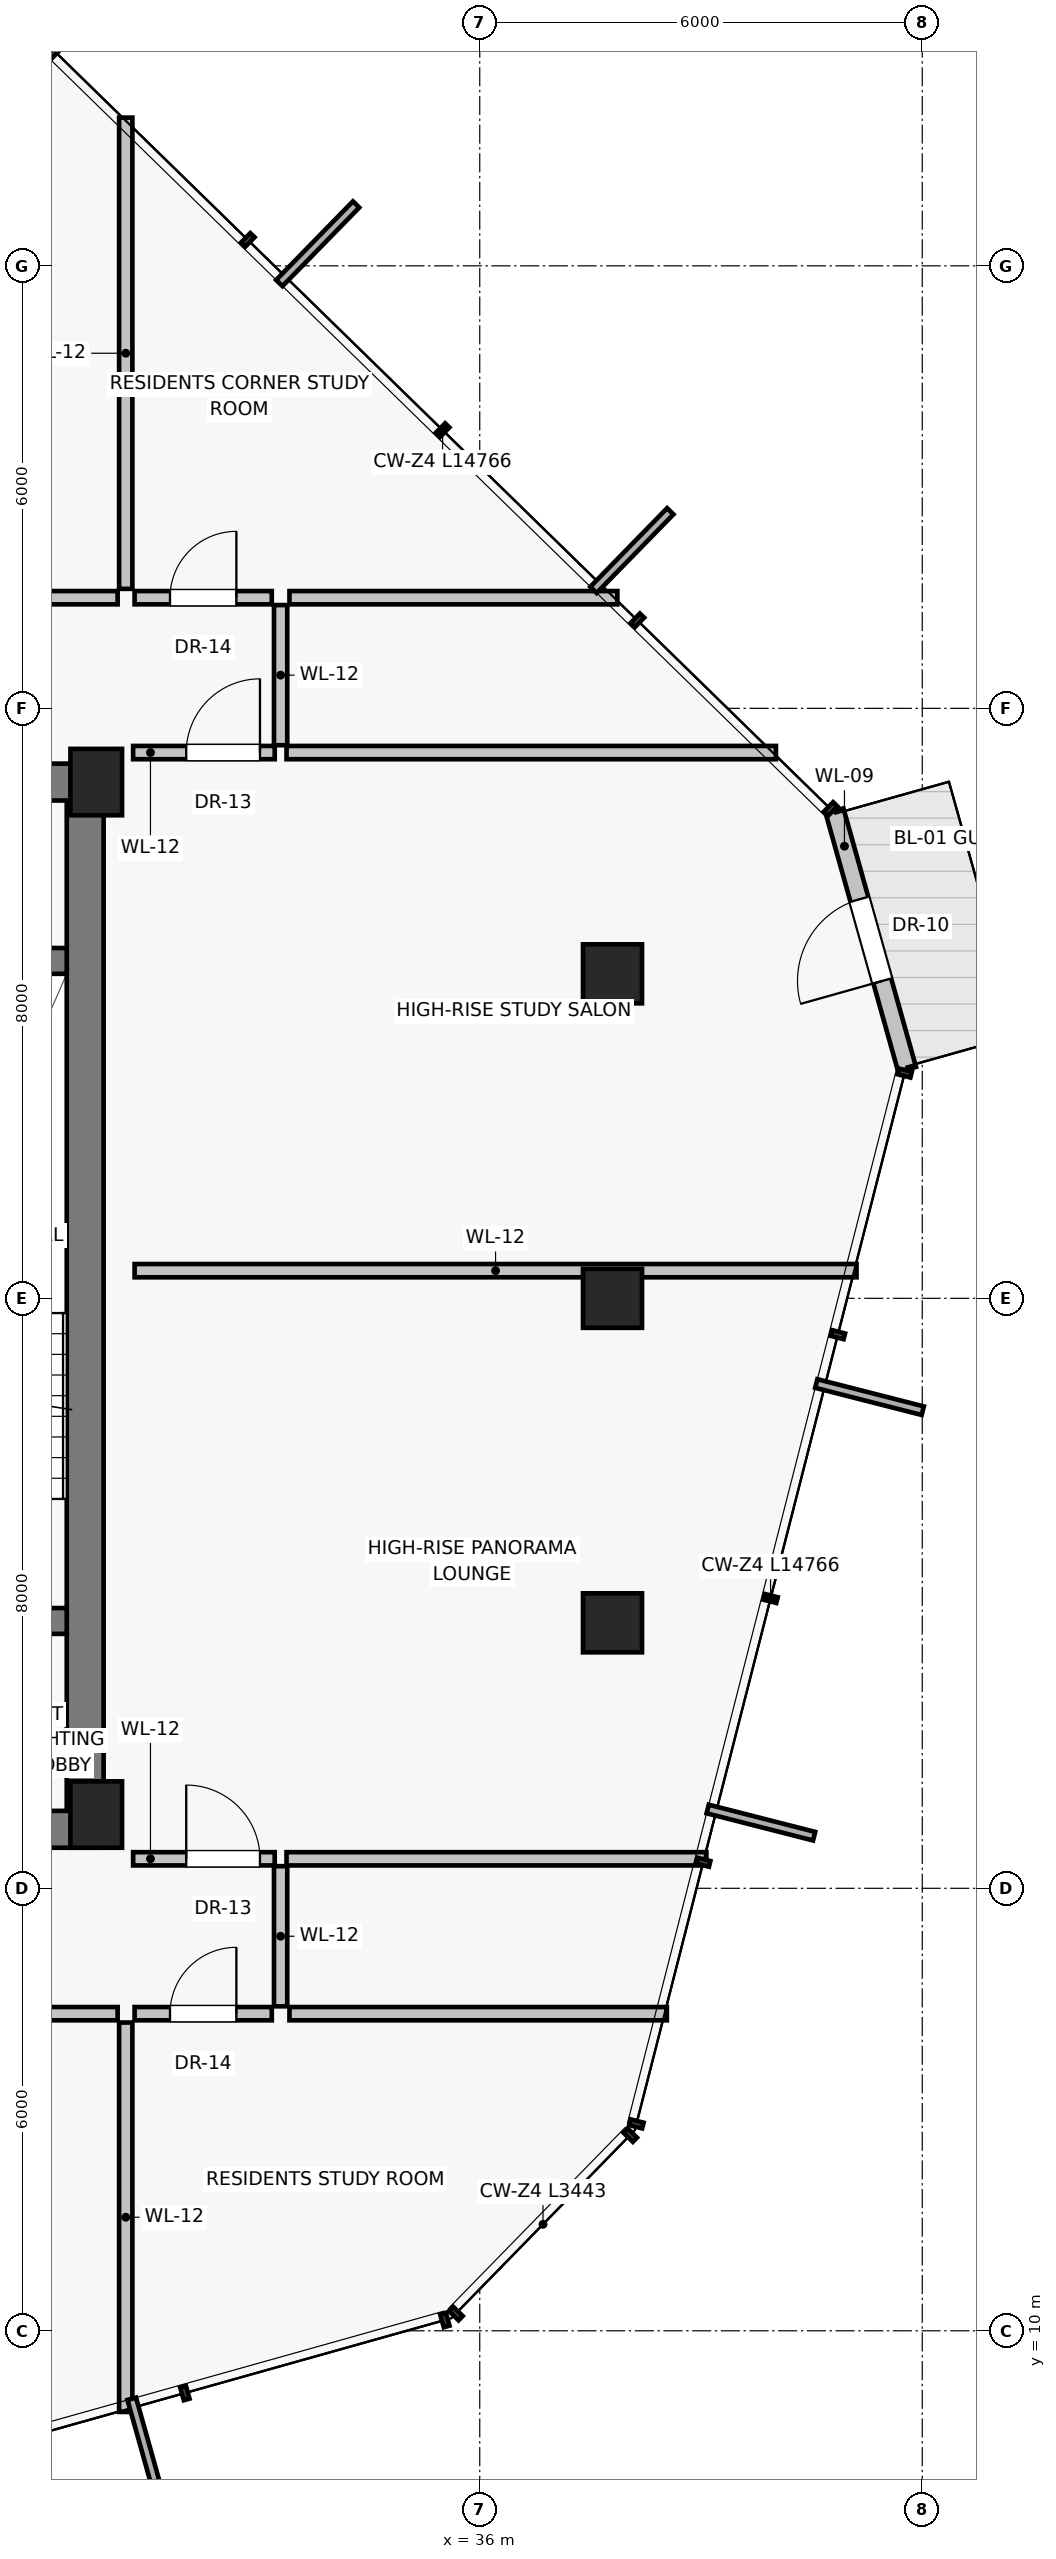
"""IFC4 building model, lengths in metres.
Left out: names, types, materials, properties, quantities, classifications, styles, units other than length and angle.
Written with IfcOpenShell. Run it as: python <this file> out.ifc"""

import sys

from ifc_helpers import new_model, si_unit, direction, frame, frame_2d, origin, origin_2d, place, context, subcontext, project, spatial, rectangle, extrude, source, transform, mapped, element, fill, save


model = new_model("IFC4")
c1 = context("Model", 3, precision=1e-05, world=origin(), true_north=direction((0.0, 1.0)))
c2 = subcontext(c1, "Body", "Model", "MODEL_VIEW")
j1 = project(units=[si_unit("LENGTHUNIT", "METRE"), si_unit("PLANEANGLEUNIT", "RADIAN")], contexts=[c1])
p1 = place(None, origin())
s1 = spatial("IfcSite", under=j1, at=p1, CompositionType="ELEMENT")
p2 = place(p1, origin())
s2 = spatial("IfcBuilding", under=s1, at=p2, CompositionType="ELEMENT")
p3 = place(p2, frame((0.0, 0.0, 257.75)))
s3 = spatial("IfcBuildingStorey", under=s2, at=p3, CompositionType="ELEMENT", Elevation=257.75)
for number, where, z_axis, x_axis in (
    (1, (30.8, 17.0, 0.0), (0.0, 0.0, 1.0), (1.0, 0.0, 0.0)),
    (2, (30.8, 31.0, 0.0), (0.0, 0.0, 1.0), (1.0, 0.0, 0.0)),
):
    element("IfcColumn", number, at=place(p3, frame(where, z_axis=z_axis, x_axis=x_axis)), inside=s3, PredefinedType="PILASTER", context=c2, shape_type="SweptSolid", body=[
        extrude(rectangle(XDim=0.7, YDim=0.9, at=origin_2d()), origin(), (0.0, 0.0, 1.0), 3.25),
    ])
for number, where, z_axis, x_axis in (
    (3, (37.8, 19.6, 0.0), (0.0, 0.0, 1.0), (1.0, 0.0, 0.0)),
    (4, (37.8, 24.0, 0.0), (0.0, 0.0, 1.0), (1.0, 0.0, 0.0)),
    (5, (37.8, 28.4, 0.0), (0.0, 0.0, 1.0), (1.0, 0.0, 0.0)),
):
    element("IfcColumn", number, at=place(p3, frame(where, z_axis=z_axis, x_axis=x_axis)), inside=s3, PredefinedType="COLUMN", context=c2, shape_type="SweptSolid", body=[
        extrude(rectangle(XDim=0.8, YDim=0.8, at=origin_2d()), origin(), (0.0, 0.0, 1.0), 3.25),
    ])
p4 = place(p3, frame((41.795, 27.104, 0.0), z_axis=(0.0, 0.0, 1.0), x_axis=(-0.270238950575, 0.962793284974, 0.0)))
e6 = element("IfcWall", 6, at=p4, inside=s3, PredefinedType="SOLIDWALL", context=c2, shape_type="SweptSolid", body=[
    extrude(rectangle(XDim=3.643, YDim=0.25, at=frame_2d((1.821, 0.0))), origin(), (0.0, 0.0, 1.0), 3.015),
])
p5 = place(p4, frame((1.246, 0.0, 0.0)))
e7 = element("IfcOpeningElement", 7, at=p5, cuts=e6, PredefinedType="OPENING", context=c2, shape_type="SweptSolid", body=[
    extrude(rectangle(XDim=1.15, YDim=2.25, at=frame_2d((0.575, 1.125))), frame((0.0, 0.135, 0.0), z_axis=(0.0, -1.0, 0.0), x_axis=(1.0, 0.0, 0.0)), (0.0, 0.0, 1.0), 0.27),
])
p6 = place(p3, frame((30.65, 16.8, 0.0), z_axis=(0.0, 0.0, 1.0), x_axis=(0.0, 1.0, 0.0)))
e8 = element("IfcWall", 8, at=p6, inside=s3, PredefinedType="SHEAR", context=c2, shape_type="SweptSolid", body=[
    extrude(rectangle(XDim=14.2, YDim=0.5, at=frame_2d((7.1, 0.0))), origin(), (0.0, 0.0, 1.0), 3.015),
])
p7 = place(p3, frame((24.95, 16.8, 0.0), z_axis=(0.0, 0.0, 1.0), x_axis=(1.0, 0.0, 0.0)))
e9 = element("IfcWall", 9, at=p7, inside=s3, PredefinedType="SHEAR", context=c2, shape_type="SweptSolid", body=[
    extrude(rectangle(XDim=5.85, YDim=0.5, at=frame_2d((2.925, 0.0))), origin(), (0.0, 0.0, 1.0), 3.015),
])
p8 = place(p7, frame((2.15, 0.0, 0.0)))
e10 = element("IfcOpeningElement", 10, at=p8, cuts=e9, PredefinedType="OPENING", context=c2, shape_type="SweptSolid", body=[
    extrude(rectangle(XDim=1.2, YDim=2.03, at=frame_2d((0.6, 1.015))), frame((0.0, 0.26, 0.0), z_axis=(0.0, -1.0, 0.0), x_axis=(1.0, 0.0, 0.0)), (0.0, 0.0, 1.0), 0.52),
])
p9 = place(p3, frame((27.0, 31.0, 0.0), z_axis=(0.0, 0.0, 1.0), x_axis=(1.0, 0.0, 0.0)))
e11 = element("IfcWall", 11, at=p9, inside=s3, PredefinedType="SHEAR", context=c2, shape_type="SweptSolid", body=[
    extrude(rectangle(XDim=3.8, YDim=0.5, at=frame_2d((1.9, 0.0))), origin(), (0.0, 0.0, 1.0), 3.015),
])
p10 = place(p9, frame((0.45, 0.0, 0.0)))
e12 = element("IfcOpeningElement", 12, at=p10, cuts=e11, PredefinedType="OPENING", context=c2, shape_type="SweptSolid", body=[
    extrude(rectangle(XDim=0.86, YDim=2.01, at=frame_2d((0.43, 1.005))), frame((0.0, 0.26, 0.0), z_axis=(0.0, -1.0, 0.0), x_axis=(1.0, 0.0, 0.0)), (0.0, 0.0, 1.0), 0.52),
])
p11 = place(p9, frame((1.9, 0.0, 0.0)))
e13 = element("IfcOpeningElement", 13, at=p11, cuts=e11, PredefinedType="OPENING", context=c2, shape_type="SweptSolid", body=[
    extrude(rectangle(XDim=0.86, YDim=2.01, at=frame_2d((0.43, 1.005))), frame((0.0, 0.26, 0.0), z_axis=(0.0, -1.0, 0.0), x_axis=(1.0, 0.0, 0.0)), (0.0, 0.0, 1.0), 0.52),
])
p12 = place(p3, frame((27.025, 19.625, 0.0), z_axis=(0.0, 0.0, 1.0), x_axis=(1.0, 0.0, 0.0)))
e14 = element("IfcWall", 14, at=p12, inside=s3, PredefinedType="SHEAR", context=c2, shape_type="SweptSolid", body=[
    extrude(rectangle(XDim=3.375, YDim=0.35, at=frame_2d((1.688, 0.0))), origin(), (0.0, 0.0, 1.0), 3.015),
])
p13 = place(p12, frame((1.05, 0.0, 0.0)))
e15 = element("IfcOpeningElement", 15, at=p13, cuts=e14, PredefinedType="OPENING", context=c2, shape_type="SweptSolid", body=[
    extrude(rectangle(XDim=1.1, YDim=2.03, at=frame_2d((0.55, 1.015))), frame((0.0, 0.185, 0.0), z_axis=(0.0, -1.0, 0.0), x_axis=(1.0, 0.0, 0.0)), (0.0, 0.0, 1.0), 0.37),
])
p14 = place(p3, frame((27.025, 28.575, 0.0), z_axis=(0.0, 0.0, 1.0), x_axis=(1.0, 0.0, 0.0)))
e16 = element("IfcWall", 16, at=p14, inside=s3, PredefinedType="SHEAR", context=c2, shape_type="SweptSolid", body=[
    extrude(rectangle(XDim=3.375, YDim=0.35, at=frame_2d((1.688, 0.0))), origin(), (0.0, 0.0, 1.0), 3.015),
])
p15 = place(p3, frame((31.2, 14.18, 0.0), z_axis=(0.0, 0.0, 1.0), x_axis=(0.0, -1.0, 0.0)))
e17 = element("IfcWall", 17, at=p15, inside=s3, PredefinedType="PARTITIONING", context=c2, shape_type="SweptSolid", body=[
    extrude(rectangle(XDim=5.281, YDim=0.18, at=frame_2d((2.64, 0.0))), origin(), (0.0, 0.0, 1.0), 3.015),
])
p16 = place(p3, frame((25.805, 14.3, 0.0), z_axis=(0.0, 0.0, 1.0), x_axis=(1.0, 0.0, 0.0)))
e18 = element("IfcWall", 18, at=p16, inside=s3, PredefinedType="PARTITIONING", context=c2, shape_type="SweptSolid", body=[
    extrude(rectangle(XDim=5.285, YDim=0.18, at=frame_2d((2.643, 0.0))), origin(), (0.0, 0.0, 1.0), 3.015),
])
p17 = place(p16, frame((3.112, 0.0, 0.0)))
e19 = element("IfcOpeningElement", 19, at=p17, cuts=e18, PredefinedType="OPENING", context=c2, shape_type="SweptSolid", body=[
    extrude(rectangle(XDim=0.95, YDim=2.02, at=frame_2d((0.475, 1.01))), frame((0.0, 0.1, 0.0), z_axis=(0.0, -1.0, 0.0), x_axis=(1.0, 0.0, 0.0)), (0.0, 0.0, 1.0), 0.2),
])
p18 = place(p3, frame((31.2, 33.62, 0.0), z_axis=(0.0, 0.0, 1.0), x_axis=(0.0, 1.0, 0.0)))
e20 = element("IfcWall", 20, at=p18, inside=s3, PredefinedType="PARTITIONING", context=c2, shape_type="SweptSolid", body=[
    extrude(rectangle(XDim=6.39, YDim=0.18, at=frame_2d((3.195, 0.0))), origin(), (0.0, 0.0, 1.0), 3.015),
])
p19 = place(p3, frame((25.18, 33.5, 0.0), z_axis=(0.0, 0.0, 1.0), x_axis=(1.0, 0.0, 0.0)))
e21 = element("IfcWall", 21, at=p19, inside=s3, PredefinedType="PARTITIONING", context=c2, shape_type="SweptSolid", body=[
    extrude(rectangle(XDim=5.91, YDim=0.18, at=frame_2d((2.955, 0.0))), origin(), (0.0, 0.0, 1.0), 3.015),
])
p20 = place(p19, frame((3.574, 0.0, 0.0)))
e22 = element("IfcOpeningElement", 22, at=p20, cuts=e21, PredefinedType="OPENING", context=c2, shape_type="SweptSolid", body=[
    extrude(rectangle(XDim=0.95, YDim=2.02, at=frame_2d((0.475, 1.01))), frame((0.0, 0.1, 0.0), z_axis=(0.0, -1.0, 0.0), x_axis=(1.0, 0.0, 0.0)), (0.0, 0.0, 1.0), 0.2),
])
p21 = place(p3, frame((31.32, 24.375, 0.0), z_axis=(0.0, 0.0, 1.0), x_axis=(1.0, 0.0, 0.0)))
e23 = element("IfcWall", 23, at=p21, inside=s3, PredefinedType="PARTITIONING", context=c2, shape_type="SweptSolid", body=[
    extrude(rectangle(XDim=9.789, YDim=0.18, at=frame_2d((4.895, 0.0))), origin(), (0.0, 0.0, 1.0), 3.015),
])
p22 = place(p3, frame((33.3, 14.4, 0.0), z_axis=(0.0, 0.0, 1.0), x_axis=(0.0, 1.0, 0.0)))
e24 = element("IfcWall", 24, at=p22, inside=s3, PredefinedType="PARTITIONING", context=c2, shape_type="SweptSolid", body=[
    extrude(rectangle(XDim=1.9, YDim=0.18, at=frame_2d((0.95, 0.0))), origin(), (0.0, 0.0, 1.0), 3.015),
])
p23 = place(p3, frame((33.3, 31.5, 0.0), z_axis=(0.0, 0.0, 1.0), x_axis=(0.0, 1.0, 0.0)))
e25 = element("IfcWall", 25, at=p23, inside=s3, PredefinedType="PARTITIONING", context=c2, shape_type="SweptSolid", body=[
    extrude(rectangle(XDim=1.9, YDim=0.18, at=frame_2d((0.95, 0.0))), origin(), (0.0, 0.0, 1.0), 3.015),
])
p24 = place(p3, frame((31.3, 16.4, 0.0), z_axis=(0.0, 0.0, 1.0), x_axis=(1.0, 0.0, 0.0)))
e26 = element("IfcWall", 26, at=p24, inside=s3, PredefinedType="PARTITIONING", context=c2, shape_type="SweptSolid", body=[
    extrude(rectangle(XDim=1.92, YDim=0.18, at=frame_2d((0.96, 0.0))), origin(), (0.0, 0.0, 1.0), 3.015),
])
p25 = place(p24, frame((0.72, 0.0, 0.0)))
e27 = element("IfcOpeningElement", 27, at=p25, cuts=e26, PredefinedType="OPENING", context=c2, shape_type="SweptSolid", body=[
    extrude(rectangle(XDim=1.0, YDim=2.01, at=frame_2d((0.5, 1.005))), frame((0.0, 0.1, 0.0), z_axis=(0.0, -1.0, 0.0), x_axis=(1.0, 0.0, 0.0)), (0.0, 0.0, 1.0), 0.2),
])
p26 = place(p3, frame((33.38, 16.4, 0.0), z_axis=(0.0, 0.0, 1.0), x_axis=(1.0, 0.0, 0.0)))
e28 = element("IfcWall", 28, at=p26, inside=s3, PredefinedType="PARTITIONING", context=c2, shape_type="SweptSolid", body=[
    extrude(rectangle(XDim=5.693, YDim=0.18, at=frame_2d((2.847, 0.0))), origin(), (0.0, 0.0, 1.0), 3.015),
])
p27 = place(p3, frame((31.3, 31.4, 0.0), z_axis=(0.0, 0.0, 1.0), x_axis=(1.0, 0.0, 0.0)))
e29 = element("IfcWall", 29, at=p27, inside=s3, PredefinedType="PARTITIONING", context=c2, shape_type="SweptSolid", body=[
    extrude(rectangle(XDim=1.92, YDim=0.18, at=frame_2d((0.96, 0.0))), origin(), (0.0, 0.0, 1.0), 3.015),
])
p28 = place(p27, frame((0.72, 0.0, 0.0)))
e30 = element("IfcOpeningElement", 30, at=p28, cuts=e29, PredefinedType="OPENING", context=c2, shape_type="SweptSolid", body=[
    extrude(rectangle(XDim=1.0, YDim=2.01, at=frame_2d((0.5, 1.005))), frame((0.0, 0.1, 0.0), z_axis=(0.0, -1.0, 0.0), x_axis=(1.0, 0.0, 0.0)), (0.0, 0.0, 1.0), 0.2),
])
p29 = place(p3, frame((33.38, 31.4, 0.0), z_axis=(0.0, 0.0, 1.0), x_axis=(1.0, 0.0, 0.0)))
e31 = element("IfcWall", 31, at=p29, inside=s3, PredefinedType="PARTITIONING", context=c2, shape_type="SweptSolid", body=[
    extrude(rectangle(XDim=6.637, YDim=0.18, at=frame_2d((3.318, 0.0))), origin(), (0.0, 0.0, 1.0), 3.015),
])
p30 = place(p3, frame((33.42, 14.3, 0.0), z_axis=(0.0, 0.0, 1.0), x_axis=(1.0, 0.0, 0.0)))
e32 = element("IfcWall", 32, at=p30, inside=s3, PredefinedType="PARTITIONING", context=c2, shape_type="SweptSolid", body=[
    extrude(rectangle(XDim=5.117, YDim=0.18, at=frame_2d((2.559, 0.0))), origin(), (0.0, 0.0, 1.0), 3.015),
])
p31 = place(p3, frame((31.32, 14.3, 0.0), z_axis=(0.0, 0.0, 1.0), x_axis=(1.0, 0.0, 0.0)))
e33 = element("IfcWall", 33, at=p31, inside=s3, PredefinedType="PARTITIONING", context=c2, shape_type="SweptSolid", body=[
    extrude(rectangle(XDim=1.86, YDim=0.18, at=frame_2d((0.93, 0.0))), origin(), (0.0, 0.0, 1.0), 3.015),
])
p32 = place(p31, frame((0.48, 0.0, 0.0)))
e34 = element("IfcOpeningElement", 34, at=p32, cuts=e33, PredefinedType="OPENING", context=c2, shape_type="SweptSolid", body=[
    extrude(rectangle(XDim=0.9, YDim=2.01, at=frame_2d((0.45, 1.005))), frame((0.0, 0.1, 0.0), z_axis=(0.0, -1.0, 0.0), x_axis=(1.0, 0.0, 0.0)), (0.0, 0.0, 1.0), 0.2),
])
p33 = place(p3, frame((33.42, 33.5, 0.0), z_axis=(0.0, 0.0, 1.0), x_axis=(1.0, 0.0, 0.0)))
e35 = element("IfcWall", 35, at=p33, inside=s3, PredefinedType="PARTITIONING", context=c2, shape_type="SweptSolid", body=[
    extrude(rectangle(XDim=4.446, YDim=0.18, at=frame_2d((2.223, 0.0))), origin(), (0.0, 0.0, 1.0), 3.015),
])
p34 = place(p3, frame((31.32, 33.5, 0.0), z_axis=(0.0, 0.0, 1.0), x_axis=(1.0, 0.0, 0.0)))
e36 = element("IfcWall", 36, at=p34, inside=s3, PredefinedType="PARTITIONING", context=c2, shape_type="SweptSolid", body=[
    extrude(rectangle(XDim=1.86, YDim=0.18, at=frame_2d((0.93, 0.0))), origin(), (0.0, 0.0, 1.0), 3.015),
])
p35 = place(p34, frame((0.48, 0.0, 0.0)))
e37 = element("IfcOpeningElement", 37, at=p35, cuts=e36, PredefinedType="OPENING", context=c2, shape_type="SweptSolid", body=[
    extrude(rectangle(XDim=0.9, YDim=2.01, at=frame_2d((0.45, 1.005))), frame((0.0, 0.1, 0.0), z_axis=(0.0, -1.0, 0.0), x_axis=(1.0, 0.0, 0.0)), (0.0, 0.0, 1.0), 0.2),
])
m1 = source(origin(), c2, "Body", "SweptSolid", [
    extrude(rectangle(XDim=1.15, YDim=2.25, at=frame_2d((0.575, 1.125))), frame((0.0, 0.025, 0.0), z_axis=(0.0, -1.0, 0.0), x_axis=(1.0, 0.0, 0.0)), (0.0, 0.0, 1.0), 0.05),
])
p36 = place(p5, frame((1.15, 0.0, 0.0), z_axis=(0.0, 0.0, 1.0), x_axis=(-1.0, 0.0, 0.0)))
e38 = element("IfcDoor", 38, at=p36, inside=s3, OperationType="SINGLE_SWING_LEFT", PredefinedType="DOOR", context=c2, shape_type="MappedRepresentation", body=[
    mapped(m1, transform((0.0, 0.0, 0.0), scale=1.0)),
])
fill(e7, e38)
m2 = source(origin(), c2, "Body", "SweptSolid", [
    extrude(rectangle(XDim=1.0, YDim=2.01, at=frame_2d((0.5, 1.005))), frame((0.0, 0.025, 0.0), z_axis=(0.0, -1.0, 0.0), x_axis=(1.0, 0.0, 0.0)), (0.0, 0.0, 1.0), 0.05),
])
p37 = place(p25, origin())
e39 = element("IfcDoor", 39, at=p37, inside=s3, OperationType="SINGLE_SWING_LEFT", PredefinedType="DOOR", context=c2, shape_type="MappedRepresentation", body=[
    mapped(m2, transform((0.0, 0.0, 0.0), scale=1.0)),
])
fill(e27, e39)
p38 = place(p28, origin())
e40 = element("IfcDoor", 40, at=p38, inside=s3, OperationType="SINGLE_SWING_RIGHT", PredefinedType="DOOR", context=c2, shape_type="MappedRepresentation", body=[
    mapped(m2, transform((0.0, 0.0, 0.0), scale=1.0)),
])
fill(e30, e40)
m3 = source(origin(), c2, "Body", "SweptSolid", [
    extrude(rectangle(XDim=0.9, YDim=2.01, at=frame_2d((0.45, 1.005))), frame((0.0, 0.025, 0.0), z_axis=(0.0, -1.0, 0.0), x_axis=(1.0, 0.0, 0.0)), (0.0, 0.0, 1.0), 0.05),
])
p39 = place(p32, origin())
e41 = element("IfcDoor", 41, at=p39, inside=s3, OperationType="SINGLE_SWING_RIGHT", PredefinedType="DOOR", context=c2, shape_type="MappedRepresentation", body=[
    mapped(m3, transform((0.0, 0.0, 0.0), scale=1.0)),
])
fill(e34, e41)
p40 = place(p35, origin())
e42 = element("IfcDoor", 42, at=p40, inside=s3, OperationType="SINGLE_SWING_RIGHT", PredefinedType="DOOR", context=c2, shape_type="MappedRepresentation", body=[
    mapped(m3, transform((0.0, 0.0, 0.0), scale=1.0)),
])
fill(e37, e42)
save(model, sys.argv[1])
